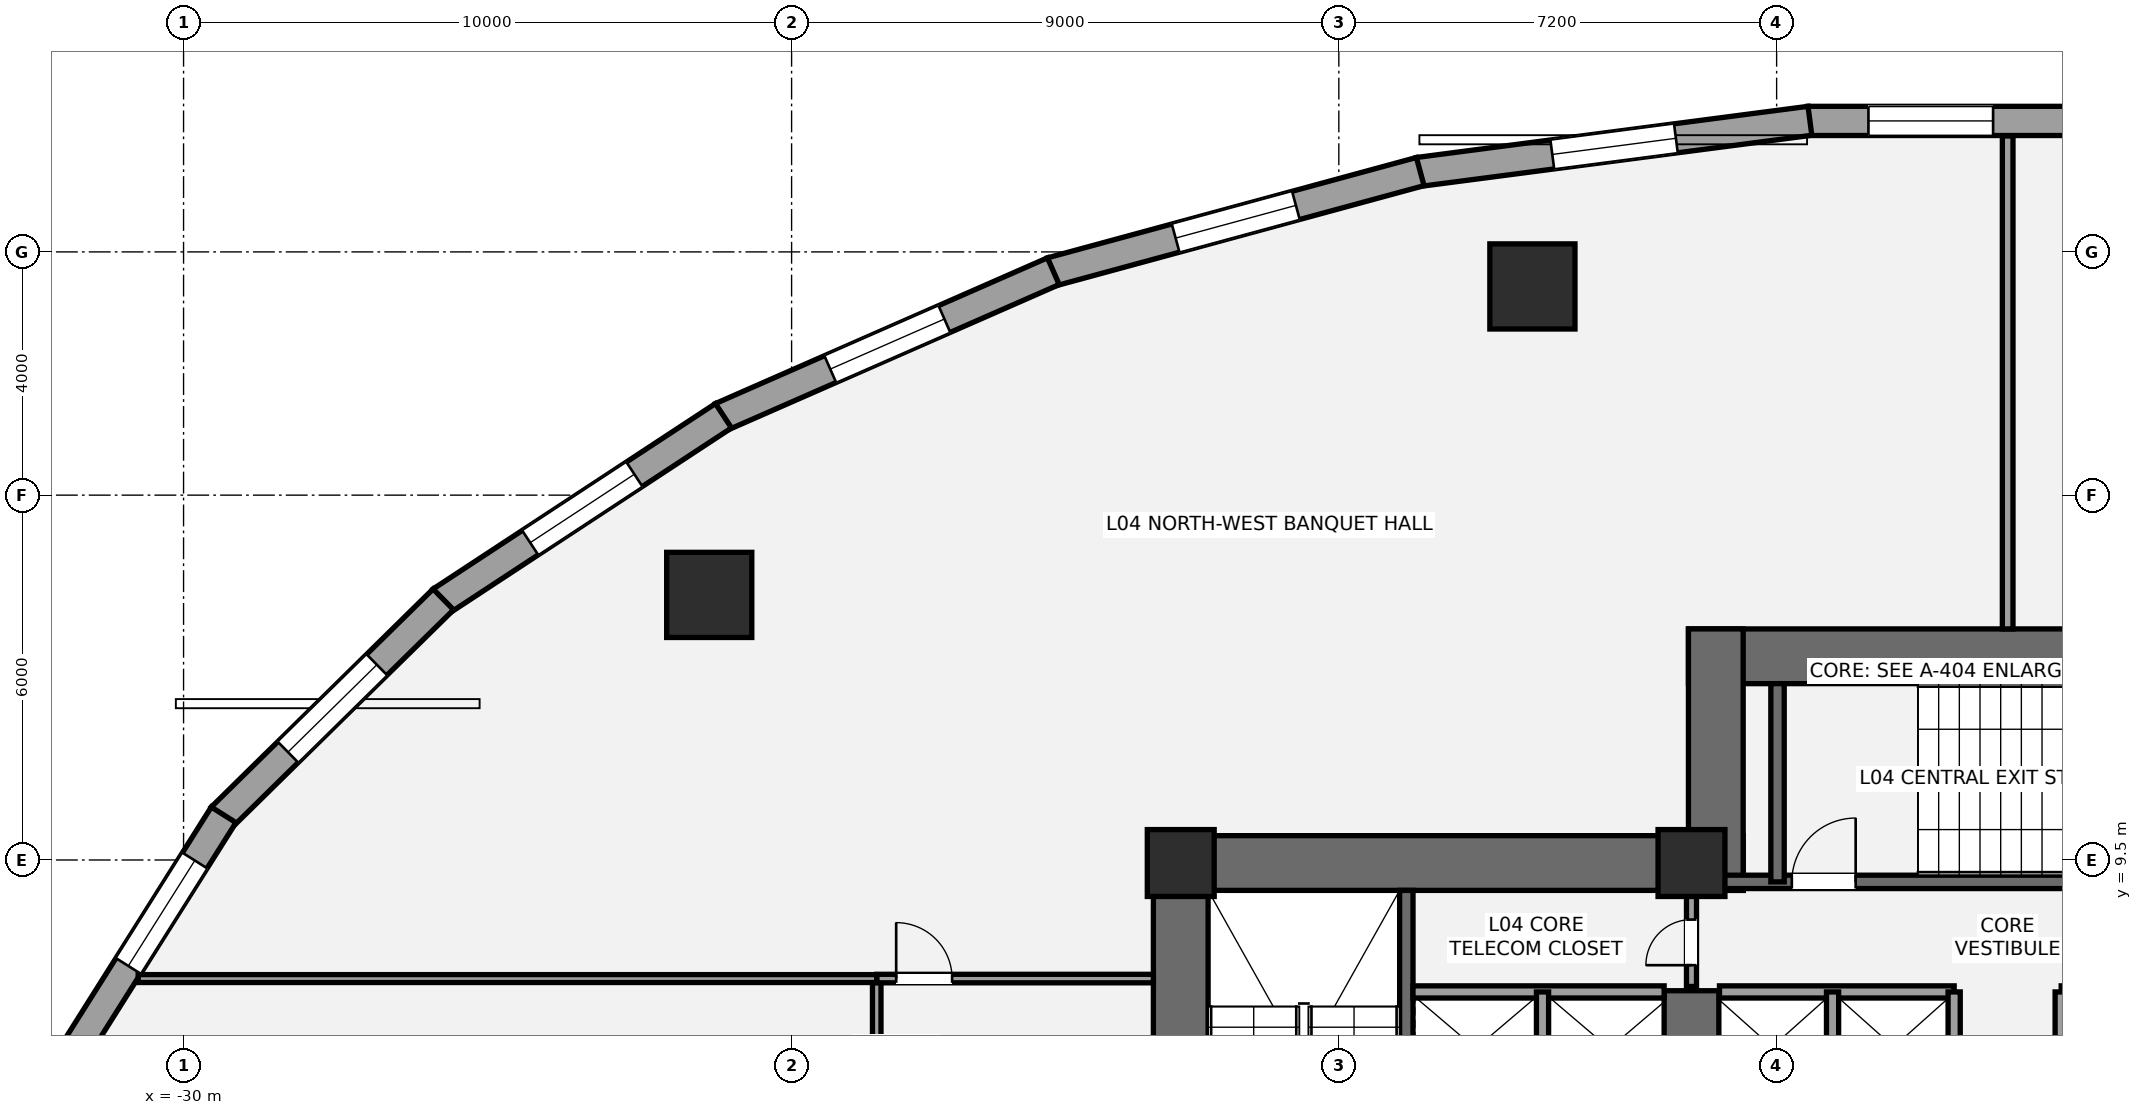
"""IFC4 building model, lengths in metres.
Left out: names, types, materials, properties, quantities, classifications, styles, units other than length and angle.
Written with IfcOpenShell. Run it as: python <this file> out.ifc"""

import sys

from ifc_helpers import new_model, si_unit, direction, frame, frame_2d, origin, origin_2d, place, context, subcontext, project, spatial, rectangle, hollow_circle, extrude, element, fill, save


model = new_model("IFC4")
c1 = context("Model", 3, precision=1e-05, world=origin(), true_north=direction((0.0, 1.0)))
c2 = subcontext(c1, "Body", "Model", "MODEL_VIEW")
j1 = project(units=[si_unit("LENGTHUNIT", "METRE"), si_unit("PLANEANGLEUNIT", "RADIAN")], contexts=[c1])
p1 = place(None, origin())
s1 = spatial("IfcSite", under=j1, at=p1, CompositionType="ELEMENT")
p2 = place(p1, origin())
s2 = spatial("IfcBuilding", under=s1, at=p2, CompositionType="ELEMENT")
p3 = place(p2, frame((0.0, 0.0, 18.6)))
s3 = spatial("IfcBuildingStorey", under=s2, at=p3, CompositionType="ELEMENT", Elevation=18.6)
p4 = place(p3, frame((-13.6, 0.95, 0.0), z_axis=(0.0, 0.0, 1.0), x_axis=(0.0, 1.0, 0.0)))
e1 = element("IfcWall", 1, at=p4, inside=s3, PredefinedType="SHEAR", context=c2, shape_type="SweptSolid", body=[
    extrude(rectangle(XDim=8.95, YDim=0.9, at=frame_2d((4.475, 0.0))), origin(), (0.0, 0.0, 1.0), 4.2),
])
p5 = place(p3, frame((-14.05, 9.45, 0.0), z_axis=(0.0, 0.0, 1.0), x_axis=(1.0, 0.0, 0.0)))
e2 = element("IfcWall", 2, at=p5, inside=s3, PredefinedType="SHEAR", context=c2, shape_type="SweptSolid", body=[
    extrude(rectangle(XDim=9.7, YDim=0.9, at=frame_2d((4.85, 0.0))), origin(), (0.0, 0.0, 1.0), 4.2),
])
p6 = place(p3, frame((-5.2, 5.35, 0.0), z_axis=(0.0, 0.0, 1.0), x_axis=(0.0, 1.0, 0.0)))
e3 = element("IfcWall", 3, at=p6, inside=s3, PredefinedType="SHEAR", context=c2, shape_type="SweptSolid", body=[
    extrude(rectangle(XDim=2.0, YDim=0.9, at=frame_2d((1.0, 0.0))), origin(), (0.0, 0.0, 1.0), 4.2),
])
p7 = place(p3, frame((-9.89, 1.85, 0.0), z_axis=(0.0, 0.0, 1.0), x_axis=(0.0, 1.0, 0.0)))
e4 = element("IfcWall", 4, at=p7, inside=s3, PredefinedType="SHEAR", context=c2, shape_type="SweptSolid", body=[
    extrude(rectangle(XDim=7.15, YDim=0.22, at=frame_2d((3.575, 0.0))), origin(), (0.0, 0.0, 1.0), 4.2),
])
p8 = place(p3, frame((-5.25, 12.85, 0.0), z_axis=(0.0, 0.0, 1.0), x_axis=(1.0, 0.0, 0.0)))
e5 = element("IfcWall", 5, at=p8, inside=s3, PredefinedType="SHEAR", context=c2, shape_type="SweptSolid", body=[
    extrude(rectangle(XDim=10.5, YDim=0.9, at=frame_2d((5.25, 0.0))), origin(), (0.0, 0.0, 1.0), 4.2),
])
p9 = place(p3, frame((-4.8, 9.0, 0.0), z_axis=(0.0, 0.0, 1.0), x_axis=(0.0, 1.0, 0.0)))
e6 = element("IfcWall", 6, at=p9, inside=s3, PredefinedType="SHEAR", context=c2, shape_type="SweptSolid", body=[
    extrude(rectangle(XDim=4.3, YDim=0.9, at=frame_2d((2.15, 0.0))), origin(), (0.0, 0.0, 1.0), 4.2),
])
p10 = place(p3, frame((-4.7, 9.14, 0.0), z_axis=(0.0, 0.0, 1.0), x_axis=(1.0, 0.0, 0.0)))
e7 = element("IfcWall", 7, at=p10, inside=s3, PredefinedType="SHEAR", context=c2, shape_type="SweptSolid", body=[
    extrude(rectangle(XDim=9.3, YDim=0.22, at=frame_2d((4.65, 0.0))), origin(), (0.0, 0.0, 1.0), 4.2),
])
p11 = place(p10, frame((1.15, 0.0, 0.0)))
e8 = element("IfcOpeningElement", 8, at=p11, cuts=e7, PredefinedType="OPENING", context=c2, shape_type="SweptSolid", body=[
    extrude(rectangle(XDim=1.05, YDim=2.15, at=frame_2d((0.525, 1.075))), frame((0.0, 0.12, 0.0), z_axis=(0.0, -1.0, 0.0), x_axis=(1.0, 0.0, 0.0)), (0.0, 0.0, 1.0), 0.24),
])
p12 = place(p3, frame((-3.785, 9.14, 0.0), z_axis=(0.0, 0.0, 1.0), x_axis=(0.0, 1.0, 0.0)))
e9 = element("IfcWall", 9, at=p12, inside=s3, PredefinedType="SHEAR", context=c2, shape_type="SweptSolid", body=[
    extrude(rectangle(XDim=3.26, YDim=0.22, at=frame_2d((1.63, 0.0))), origin(), (0.0, 0.0, 1.0), 4.2),
])
for number, where, z_axis, x_axis in (
    (10, (-13.6, 9.45, 0.0), (0.0, 0.0, 1.0), (1.0, 0.0, 0.0)),
    (11, (-5.2, 9.45, 0.0), (0.0, 0.0, 1.0), (1.0, 0.0, 0.0)),
):
    element("IfcColumn", number, at=place(p3, frame(where, z_axis=z_axis, x_axis=x_axis)), inside=s3, PredefinedType="COLUMN", context=c2, shape_type="SweptSolid", body=[
        extrude(rectangle(XDim=1.1, YDim=1.1, at=origin_2d()), origin(), (0.0, 0.0, 1.0), 4.2),
    ])
for number, where, z_axis, x_axis in (
    (12, (-7.816, 18.932, 0.0), (0.0, 0.0, 1.0), (1.0, 0.0, 0.0)),
    (13, (-21.354, 13.859, 0.0), (0.0, 0.0, 1.0), (1.0, 0.0, 0.0)),
):
    element("IfcColumn", number, at=place(p3, frame(where, z_axis=z_axis, x_axis=x_axis)), inside=s3, PredefinedType="USERDEFINED", context=c2, shape_type="SweptSolid", body=[
        extrude(hollow_circle(Radius=0.7, WallThickness=0.05, at=origin_2d()), origin(), (0.0, 0.0, 1.0), 4.2),
    ])
p13 = place(p3, frame((-3.284, 21.654, 0.0), z_axis=(0.0, 0.0, 1.0), x_axis=(1.0, 0.0, 0.0)))
e14 = element("IfcWall", 14, at=p13, inside=s3, PredefinedType="STANDARD", context=c2, shape_type="SweptSolid", body=[
    extrude(rectangle(XDim=6.567, YDim=0.48, at=frame_2d((3.284, 0.0))), origin(), (0.0, 0.0, 1.0), 3.109),
])
p14 = place(p13, frame((0.994, 0.0, 0.72)))
e15 = element("IfcOpeningElement", 15, at=p14, cuts=e14, PredefinedType="OPENING", context=c2, shape_type="SweptSolid", body=[
    extrude(rectangle(XDim=2.05, YDim=1.8, at=frame_2d((1.025, 0.9))), frame((0.0, 0.25, 0.0), z_axis=(0.0, -1.0, 0.0), x_axis=(1.0, 0.0, 0.0)), (0.0, 0.0, 1.0), 0.5),
])
p15 = place(p3, frame((-9.693, 20.815, 0.0), z_axis=(0.0, 0.0, 1.0), x_axis=(0.991576921472, 0.129519144545, 0.0)))
e16 = element("IfcWall", 16, at=p15, inside=s3, PredefinedType="STANDARD", context=c2, shape_type="SweptSolid", body=[
    extrude(rectangle(XDim=6.496, YDim=0.48, at=frame_2d((3.248, 0.0))), origin(), (0.0, 0.0, 1.0), 3.109),
])
p16 = place(p15, frame((2.223, 0.0, 0.72)))
e17 = element("IfcOpeningElement", 17, at=p16, cuts=e16, PredefinedType="OPENING", context=c2, shape_type="SweptSolid", body=[
    extrude(rectangle(XDim=2.05, YDim=1.8, at=frame_2d((1.025, 0.9))), frame((0.0, 0.25, 0.0), z_axis=(0.0, -1.0, 0.0), x_axis=(1.0, 0.0, 0.0)), (0.0, 0.0, 1.0), 0.5),
])
p17 = place(p3, frame((-15.729, 19.171, 0.0), z_axis=(0.0, 0.0, 1.0), x_axis=(0.964936550718, 0.262483243445, 0.0)))
e18 = element("IfcWall", 18, at=p17, inside=s3, PredefinedType="STANDARD", context=c2, shape_type="SweptSolid", body=[
    extrude(rectangle(XDim=6.288, YDim=0.48, at=frame_2d((3.144, 0.0))), origin(), (0.0, 0.0, 1.0), 3.109),
])
p18 = place(p17, frame((2.119, 0.0, 0.72)))
e19 = element("IfcOpeningElement", 19, at=p18, cuts=e18, PredefinedType="OPENING", context=c2, shape_type="SweptSolid", body=[
    extrude(rectangle(XDim=2.05, YDim=1.8, at=frame_2d((1.025, 0.9))), frame((0.0, 0.25, 0.0), z_axis=(0.0, -1.0, 0.0), x_axis=(1.0, 0.0, 0.0)), (0.0, 0.0, 1.0), 0.5),
])
p19 = place(p3, frame((-21.156, 16.786, 0.0), z_axis=(0.0, 0.0, 1.0), x_axis=(0.91570760638, 0.401845218484, 0.0)))
e20 = element("IfcWall", 20, at=p19, inside=s3, PredefinedType="STANDARD", context=c2, shape_type="SweptSolid", body=[
    extrude(rectangle(XDim=5.963, YDim=0.48, at=frame_2d((2.981, 0.0))), origin(), (0.0, 0.0, 1.0), 3.109),
])
p20 = place(p19, frame((1.957, 0.0, 0.72)))
e21 = element("IfcOpeningElement", 21, at=p20, cuts=e20, PredefinedType="OPENING", context=c2, shape_type="SweptSolid", body=[
    extrude(rectangle(XDim=2.05, YDim=1.8, at=frame_2d((1.025, 0.9))), frame((0.0, 0.25, 0.0), z_axis=(0.0, -1.0, 0.0), x_axis=(1.0, 0.0, 0.0)), (0.0, 0.0, 1.0), 0.5),
])
p21 = place(p3, frame((-25.764, 13.756, 0.0), z_axis=(0.0, 0.0, 1.0), x_axis=(0.835863918172, 0.548936708827, 0.0)))
e22 = element("IfcWall", 22, at=p21, inside=s3, PredefinedType="STANDARD", context=c2, shape_type="SweptSolid", body=[
    extrude(rectangle(XDim=5.555, YDim=0.48, at=frame_2d((2.778, 0.0))), origin(), (0.0, 0.0, 1.0), 3.109),
])
p22 = place(p21, frame((1.753, 0.0, 0.72)))
e23 = element("IfcOpeningElement", 23, at=p22, cuts=e22, PredefinedType="OPENING", context=c2, shape_type="SweptSolid", body=[
    extrude(rectangle(XDim=2.05, YDim=1.8, at=frame_2d((1.025, 0.9))), frame((0.0, 0.25, 0.0), z_axis=(0.0, -1.0, 0.0), x_axis=(1.0, 0.0, 0.0)), (0.0, 0.0, 1.0), 0.5),
])
p23 = place(p3, frame((-29.376, 10.199, 0.0), z_axis=(0.0, 0.0, 1.0), x_axis=(0.713189080178, 0.700971708355, 0.0)))
e24 = element("IfcWall", 24, at=p23, inside=s3, PredefinedType="STANDARD", context=c2, shape_type="SweptSolid", body=[
    extrude(rectangle(XDim=5.116, YDim=0.48, at=frame_2d((2.558, 0.0))), origin(), (0.0, 0.0, 1.0), 3.109),
])
p24 = place(p23, frame((1.533, 0.0, 0.72)))
e25 = element("IfcOpeningElement", 25, at=p24, cuts=e24, PredefinedType="OPENING", context=c2, shape_type="SweptSolid", body=[
    extrude(rectangle(XDim=2.05, YDim=1.8, at=frame_2d((1.025, 0.9))), frame((0.0, 0.25, 0.0), z_axis=(0.0, -1.0, 0.0), x_axis=(1.0, 0.0, 0.0)), (0.0, 0.0, 1.0), 0.5),
])
p25 = place(p3, frame((-31.854, 6.258, 0.0), z_axis=(0.0, 0.0, 1.0), x_axis=(0.53349762721, 0.845801561693, 0.0)))
e26 = element("IfcWall", 26, at=p25, inside=s3, PredefinedType="STANDARD", context=c2, shape_type="SweptSolid", body=[
    extrude(rectangle(XDim=4.711, YDim=0.48, at=frame_2d((2.355, 0.0))), origin(), (0.0, 0.0, 1.0), 3.109),
])
p26 = place(p25, frame((1.773, 0.0, 0.72)))
e27 = element("IfcOpeningElement", 27, at=p26, cuts=e26, PredefinedType="OPENING", context=c2, shape_type="SweptSolid", body=[
    extrude(rectangle(XDim=2.05, YDim=1.8, at=frame_2d((1.025, 0.9))), frame((0.0, 0.25, 0.0), z_axis=(0.0, -1.0, 0.0), x_axis=(1.0, 0.0, 0.0)), (0.0, 0.0, 1.0), 0.5),
])
p27 = place(p3, frame((-9.78, 7.33, 0.0), z_axis=(0.0, 0.0, 1.0), x_axis=(1.0, 0.0, 0.0)))
e28 = element("IfcWall", 28, at=p27, inside=s3, PredefinedType="SOLIDWALL", context=c2, shape_type="SweptSolid", body=[
    extrude(rectangle(XDim=4.13, YDim=0.2, at=frame_2d((2.065, 0.0))), origin(), (0.0, 0.0, 1.0), 3.98),
])
p28 = place(p3, frame((-7.65, 5.47, 0.0), z_axis=(0.0, 0.0, 1.0), x_axis=(0.0, 1.0, 0.0)))
e29 = element("IfcWall", 29, at=p28, inside=s3, PredefinedType="SOLIDWALL", context=c2, shape_type="SweptSolid", body=[
    extrude(rectangle(XDim=1.86, YDim=0.2, at=frame_2d((0.93, 0.0))), origin(), (0.0, 0.0, 1.0), 3.98),
])
for number, where, z_axis, x_axis in (
    (30, (-4.74, 7.33, 0.0), (0.0, 0.0, 1.0), (1.0, 0.0, 0.0)),
    (31, (0.88, 7.33, 0.0), (0.0, 0.0, 1.0), (1.0, 0.0, 0.0)),
):
    element("IfcWall", number, at=place(p3, frame(where, z_axis=z_axis, x_axis=x_axis)), inside=s3, PredefinedType="SOLIDWALL", context=c2, shape_type="SweptSolid", body=[
        extrude(rectangle(XDim=3.86, YDim=0.2, at=frame_2d((1.93, 0.0))), origin(), (0.0, 0.0, 1.0), 3.98),
    ])
for number, where, z_axis, x_axis in (
    (32, (-2.88, 5.52, 0.0), (0.0, 0.0, 1.0), (0.0, 1.0, 0.0)),
    (33, (-0.88, 5.52, 0.0), (0.0, 0.0, 1.0), (0.0, 1.0, 0.0)),
    (34, (0.88, 5.52, 0.0), (0.0, 0.0, 1.0), (0.0, 1.0, 0.0)),
):
    element("IfcWall", number, at=place(p3, frame(where, z_axis=z_axis, x_axis=x_axis)), inside=s3, PredefinedType="SOLIDWALL", context=c2, shape_type="SweptSolid", body=[
        extrude(rectangle(XDim=1.81, YDim=0.2, at=frame_2d((0.905, 0.0))), origin(), (0.0, 0.0, 1.0), 3.98),
    ])
p29 = place(p3, frame((-5.2, 7.42, 0.0), z_axis=(0.0, 0.0, 1.0), x_axis=(0.0, 1.0, 0.0)))
e35 = element("IfcWall", 35, at=p29, inside=s3, PredefinedType="PARTITIONING", context=c2, shape_type="SweptSolid", body=[
    extrude(rectangle(XDim=1.58, YDim=0.165, at=frame_2d((0.79, 0.0))), origin(), (0.0, 0.0, 1.0), 3.98),
])
p30 = place(p29, frame((0.35, 0.0, 0.0)))
e36 = element("IfcOpeningElement", 36, at=p30, cuts=e35, PredefinedType="OPENING", context=c2, shape_type="SweptSolid", body=[
    extrude(rectangle(XDim=0.75, YDim=2.1, at=frame_2d((0.375, 1.05))), frame((0.0, 0.093, 0.0), z_axis=(0.0, -1.0, 0.0), x_axis=(1.0, 0.0, 0.0)), (0.0, 0.0, 1.0), 0.185),
])
p31 = place(p3, frame((-18.6, -17.637, 0.0), z_axis=(0.0, 0.0, 1.0), x_axis=(0.0, 1.0, 0.0)))
e37 = element("IfcWall", 37, at=p31, inside=s3, PredefinedType="PARTITIONING", context=c2, shape_type="SweptSolid", body=[
    extrude(rectangle(XDim=25.187, YDim=0.14, at=frame_2d((12.594, 0.0))), origin(), (0.0, 0.0, 1.0), 3.348),
])
p32 = place(p31, frame((14.487, 0.0, 0.0)))
e38 = element("IfcOpeningElement", 38, at=p32, cuts=e37, PredefinedType="OPENING", context=c2, shape_type="SweptSolid", body=[
    extrude(rectangle(XDim=0.9, YDim=2.1, at=frame_2d((0.45, 1.05))), frame((0.0, 0.08, 0.0), z_axis=(0.0, -1.0, 0.0), x_axis=(1.0, 0.0, 0.0)), (0.0, 0.0, 1.0), 0.16),
])
p33 = place(p31, frame((21.862, 0.0, 0.0)))
e39 = element("IfcOpeningElement", 39, at=p33, cuts=e37, PredefinedType="OPENING", context=c2, shape_type="SweptSolid", body=[
    extrude(rectangle(XDim=0.9, YDim=2.1, at=frame_2d((0.45, 1.05))), frame((0.0, 0.08, 0.0), z_axis=(0.0, -1.0, 0.0), x_axis=(1.0, 0.0, 0.0)), (0.0, 0.0, 1.0), 0.16),
])
p34 = place(p3, frame((-18.6, 7.55, 0.0), z_axis=(0.0, 0.0, 1.0), x_axis=(1.0, 0.0, 0.0)))
e40 = element("IfcWall", 40, at=p34, inside=s3, PredefinedType="PARTITIONING", context=c2, shape_type="SweptSolid", body=[
    extrude(rectangle(XDim=4.55, YDim=0.14, at=frame_2d((2.275, 0.0))), origin(), (0.0, 0.0, 1.0), 3.433),
])
p35 = place(p34, frame((0.32, 0.0, 0.0)))
e41 = element("IfcOpeningElement", 41, at=p35, cuts=e40, PredefinedType="OPENING", context=c2, shape_type="SweptSolid", body=[
    extrude(rectangle(XDim=0.92, YDim=2.15, at=frame_2d((0.46, 1.075))), frame((0.0, 0.08, 0.0), z_axis=(0.0, -1.0, 0.0), x_axis=(1.0, 0.0, 0.0)), (0.0, 0.0, 1.0), 0.16),
])
p36 = place(p3, frame((0.0, 13.3, 0.0), z_axis=(0.0, 0.0, 1.0), x_axis=(0.0, 1.0, 0.0)))
e42 = element("IfcWall", 42, at=p36, inside=s3, PredefinedType="PARTITIONING", context=c2, shape_type="SweptSolid", body=[
    extrude(rectangle(XDim=8.106, YDim=0.175, at=frame_2d((4.053, 0.0))), origin(), (0.0, 0.0, 1.0), 3.98),
])
p37 = place(p3, frame((-30.747, 7.55, 0.0), z_axis=(0.0, 0.0, 1.0), x_axis=(1.0, 0.0, 0.0)))
e43 = element("IfcWall", 43, at=p37, inside=s3, PredefinedType="PARTITIONING", context=c2, shape_type="SweptSolid", body=[
    extrude(rectangle(XDim=12.146, YDim=0.13, at=frame_2d((6.073, 0.0))), origin(), (0.0, 0.0, 1.0), 2.958),
])
p38 = place(p14, origin())
e44 = element("IfcWindow", 44, at=p38, inside=s3, PartitioningType="SINGLE_PANEL", PredefinedType="WINDOW", context=c2, shape_type="SweptSolid", body=[
    extrude(rectangle(XDim=2.05, YDim=1.8, at=frame_2d((1.025, 0.9))), frame((0.0, -0.01, 0.0), z_axis=(0.0, -1.0, 0.0), x_axis=(1.0, 0.0, 0.0)), (0.0, 0.0, 1.0), 0.06),
])
fill(e15, e44)
p39 = place(p16, origin())
e45 = element("IfcWindow", 45, at=p39, inside=s3, PartitioningType="SINGLE_PANEL", PredefinedType="WINDOW", context=c2, shape_type="SweptSolid", body=[
    extrude(rectangle(XDim=2.05, YDim=1.8, at=frame_2d((1.025, 0.9))), frame((0.0, -0.01, 0.0), z_axis=(0.0, -1.0, 0.0), x_axis=(1.0, 0.0, 0.0)), (0.0, 0.0, 1.0), 0.06),
])
fill(e17, e45)
p40 = place(p18, origin())
e46 = element("IfcWindow", 46, at=p40, inside=s3, PartitioningType="SINGLE_PANEL", PredefinedType="WINDOW", context=c2, shape_type="SweptSolid", body=[
    extrude(rectangle(XDim=2.05, YDim=1.8, at=frame_2d((1.025, 0.9))), frame((0.0, -0.01, 0.0), z_axis=(0.0, -1.0, 0.0), x_axis=(1.0, 0.0, 0.0)), (0.0, 0.0, 1.0), 0.06),
])
fill(e19, e46)
p41 = place(p20, origin())
e47 = element("IfcWindow", 47, at=p41, inside=s3, PartitioningType="SINGLE_PANEL", PredefinedType="WINDOW", context=c2, shape_type="SweptSolid", body=[
    extrude(rectangle(XDim=2.05, YDim=1.8, at=frame_2d((1.025, 0.9))), frame((0.0, -0.01, 0.0), z_axis=(0.0, -1.0, 0.0), x_axis=(1.0, 0.0, 0.0)), (0.0, 0.0, 1.0), 0.06),
])
fill(e21, e47)
p42 = place(p22, origin())
e48 = element("IfcWindow", 48, at=p42, inside=s3, PartitioningType="SINGLE_PANEL", PredefinedType="WINDOW", context=c2, shape_type="SweptSolid", body=[
    extrude(rectangle(XDim=2.05, YDim=1.8, at=frame_2d((1.025, 0.9))), frame((0.0, -0.01, 0.0), z_axis=(0.0, -1.0, 0.0), x_axis=(1.0, 0.0, 0.0)), (0.0, 0.0, 1.0), 0.06),
])
fill(e23, e48)
p43 = place(p24, origin())
e49 = element("IfcWindow", 49, at=p43, inside=s3, PartitioningType="SINGLE_PANEL", PredefinedType="WINDOW", context=c2, shape_type="SweptSolid", body=[
    extrude(rectangle(XDim=2.05, YDim=1.8, at=frame_2d((1.025, 0.9))), frame((0.0, -0.01, 0.0), z_axis=(0.0, -1.0, 0.0), x_axis=(1.0, 0.0, 0.0)), (0.0, 0.0, 1.0), 0.06),
])
fill(e25, e49)
p44 = place(p26, origin())
e50 = element("IfcWindow", 50, at=p44, inside=s3, PartitioningType="SINGLE_PANEL", PredefinedType="WINDOW", context=c2, shape_type="SweptSolid", body=[
    extrude(rectangle(XDim=2.05, YDim=1.8, at=frame_2d((1.025, 0.9))), frame((0.0, -0.01, 0.0), z_axis=(0.0, -1.0, 0.0), x_axis=(1.0, 0.0, 0.0)), (0.0, 0.0, 1.0), 0.06),
])
fill(e27, e50)
p45 = place(p11, origin())
e51 = element("IfcDoor", 51, at=p45, inside=s3, OperationType="SINGLE_SWING_RIGHT", PredefinedType="DOOR", context=c2, shape_type="SweptSolid", body=[
    extrude(rectangle(XDim=1.05, YDim=2.15, at=frame_2d((0.525, 1.075))), frame((0.0, 0.025, 0.0), z_axis=(0.0, -1.0, 0.0), x_axis=(1.0, 0.0, 0.0)), (0.0, 0.0, 1.0), 0.05),
])
fill(e8, e51)
p46 = place(p30, origin())
e52 = element("IfcDoor", 52, at=p46, inside=s3, OperationType="SINGLE_SWING_LEFT", PredefinedType="DOOR", context=c2, shape_type="SweptSolid", body=[
    extrude(rectangle(XDim=0.75, YDim=2.1, at=frame_2d((0.375, 1.05))), frame((0.0, 0.025, 0.0), z_axis=(0.0, -1.0, 0.0), x_axis=(1.0, 0.0, 0.0)), (0.0, 0.0, 1.0), 0.05),
])
fill(e36, e52)
p47 = place(p35, origin())
e53 = element("IfcDoor", 53, at=p47, inside=s3, OperationType="SINGLE_SWING_LEFT", PredefinedType="DOOR", context=c2, shape_type="SweptSolid", body=[
    extrude(rectangle(XDim=0.92, YDim=2.15, at=frame_2d((0.46, 1.075))), frame((0.0, 0.025, 0.0), z_axis=(0.0, -1.0, 0.0), x_axis=(1.0, 0.0, 0.0)), (0.0, 0.0, 1.0), 0.05),
])
fill(e41, e53)
save(model, sys.argv[1])
